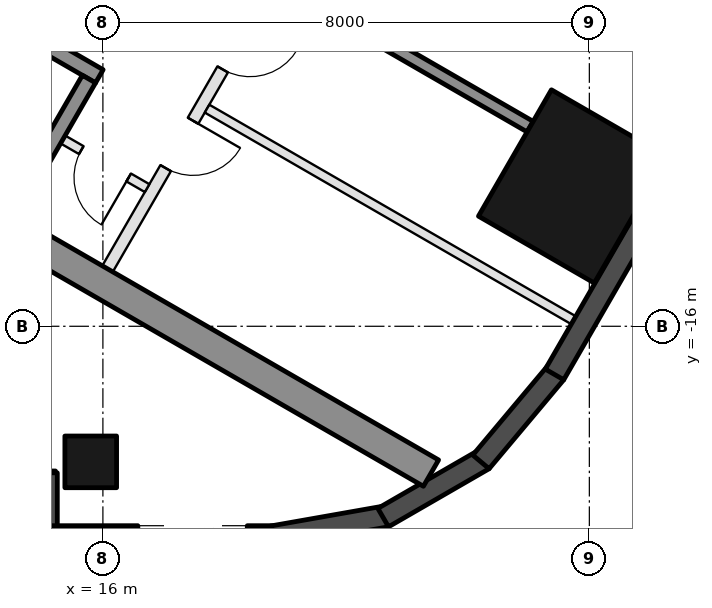
"""IFC4 building model, lengths in metres.
Left out: names, types, materials, properties, quantities, classifications, styles, units other than length and angle.
Written with IfcOpenShell. Run it as: python <this file> out.ifc"""

import sys

from ifc_helpers import new_model, si_unit, direction, frame, frame_2d, origin, origin_2d, place, context, subcontext, project, spatial, rectangle, hollow_rectangle, extrude, element, fill, save


model = new_model("IFC4")
c1 = context("Model", 3, precision=1e-05, world=origin(), true_north=direction((0.0, 1.0)))
c2 = subcontext(c1, "Body", "Model", "MODEL_VIEW")
j1 = project(units=[si_unit("LENGTHUNIT", "METRE"), si_unit("PLANEANGLEUNIT", "RADIAN")], contexts=[c1])
p1 = place(None, origin())
s1 = spatial("IfcSite", under=j1, at=p1, CompositionType="ELEMENT")
p2 = place(p1, origin())
s2 = spatial("IfcBuilding", under=s1, at=p2, CompositionType="ELEMENT")
p3 = place(p2, frame((0.0, 0.0, 179.9)))
s3 = spatial("IfcBuildingStorey", under=s2, at=p3, CompositionType="ELEMENT", Elevation=179.9)
p4 = place(p3, frame((15.8, -18.23, 0.0), z_axis=(0.0, 0.0, 1.0), x_axis=(-1.0, 0.0, 0.0)))
e1 = element("IfcColumn", 1, at=p4, inside=s3, PredefinedType="COLUMN", context=c2, shape_type="SweptSolid", body=[
    extrude(hollow_rectangle(XDim=0.85, YDim=0.85, WallThickness=0.04, at=origin_2d()), origin(), (0.0, 0.0, 1.0), 3.7),
])
p5 = place(p3, frame((23.729, -13.7, 0.0), z_axis=(0.0, 0.0, 1.0), x_axis=(0.5, 0.866025403784, 0.0)))
e2 = element("IfcColumn", 2, at=p5, inside=s3, PredefinedType="COLUMN", context=c2, shape_type="SweptSolid", body=[
    extrude(hollow_rectangle(XDim=2.4, YDim=2.2, WallThickness=0.06, at=origin_2d()), origin(), (0.0, 0.0, 1.0), 3.7),
])
p6 = place(p3, frame((8.48, -18.555, 0.0), z_axis=(0.0, 0.0, 1.0), x_axis=(1.0, 0.0, 0.0)))
e3 = element("IfcWall", 3, at=p6, inside=s3, PredefinedType="SOLIDWALL", context=c2, shape_type="SweptSolid", body=[
    extrude(rectangle(XDim=6.74, YDim=0.35, at=frame_2d((3.37, 0.0))), origin(), (0.0, 0.0, 1.0), 3.55),
])
p7 = place(p6, frame((3.57, 0.0, 0.0)))
e4 = element("IfcOpeningElement", 4, at=p7, cuts=e3, PredefinedType="OPENING", context=c2, shape_type="SweptSolid", body=[
    extrude(rectangle(XDim=2.4, YDim=2.4, at=frame_2d((1.2, 1.2))), frame((0.0, 0.185, 0.0), z_axis=(0.0, -1.0, 0.0), x_axis=(1.0, 0.0, 0.0)), (0.0, 0.0, 1.0), 0.37),
])
p8 = place(p6, frame((0.32, 0.0, 0.3)))
e5 = element("IfcOpeningElement", 5, at=p8, cuts=e3, PredefinedType="OPENING", context=c2, shape_type="SweptSolid", body=[
    extrude(rectangle(XDim=2.9, YDim=2.65, at=frame_2d((1.45, 1.325))), frame((0.0, 0.185, 0.0), z_axis=(0.0, -1.0, 0.0), x_axis=(1.0, 0.0, 0.0)), (0.0, 0.0, 1.0), 0.37),
])
p9 = place(p3, frame((15.075, -18.41, 0.0), z_axis=(0.0, 0.0, 1.0), x_axis=(0.0, -1.0, 0.0)))
e6 = element("IfcWall", 6, at=p9, inside=s3, PredefinedType="SOLIDWALL", context=c2, shape_type="SweptSolid", body=[
    extrude(rectangle(XDim=1.22, YDim=0.35, at=frame_2d((0.61, 0.0))), origin(), (0.0, 0.0, 1.0), 3.55),
])
p10 = place(p3, frame((14.9, -19.455, 0.0), z_axis=(0.0, 0.0, 1.0), x_axis=(1.0, 0.0, 0.0)))
e7 = element("IfcWall", 7, at=p10, inside=s3, PredefinedType="SOLIDWALL", context=c2, shape_type="SweptSolid", body=[
    extrude(rectangle(XDim=3.916, YDim=0.35, at=frame_2d((1.958, 0.0))), origin(), (0.0, 0.0, 1.0), 3.55),
])
p11 = place(p10, frame((1.675, 0.0, 0.3)))
e8 = element("IfcOpeningElement", 8, at=p11, cuts=e7, PredefinedType="OPENING", context=c2, shape_type="SweptSolid", body=[
    extrude(rectangle(XDim=1.8, YDim=2.65, at=frame_2d((0.9, 1.325))), frame((0.0, 0.185, 0.0), z_axis=(0.0, -1.0, 0.0), x_axis=(1.0, 0.0, 0.0)), (0.0, 0.0, 1.0), 0.37),
])
p12 = place(p3, frame((18.785, -19.458, 0.0), z_axis=(0.0, 0.0, 1.0), x_axis=(0.984798995425, 0.173697837091, 0.0)))
e9 = element("IfcWall", 9, at=p12, inside=s3, PredefinedType="SOLIDWALL", context=c2, shape_type="SweptSolid", body=[
    extrude(rectangle(XDim=1.91, YDim=0.35, at=frame_2d((0.955, 0.0))), origin(), (0.0, 0.0, 1.0), 3.55),
])
for number, where, z_axis, x_axis in (
    (10, (20.61, -19.147, 0.0), (0.0, 0.0, 1.0), (0.866, 0.5, 0.0)),
    (11, (22.217, -18.231, 0.0), (0.0, 0.0, 1.0), (0.643, 0.766, 0.0)),
):
    element("IfcWall", number, at=place(p3, frame(where, z_axis=z_axis, x_axis=x_axis)), inside=s3, PredefinedType="SOLIDWALL", context=c2, shape_type="SweptSolid", body=[
        extrude(rectangle(XDim=1.91, YDim=0.35, at=frame_2d((0.955, 0.0))), origin(), (0.0, 0.0, 1.0), 3.55),
    ])
p13 = place(p3, frame((23.427, -16.792, 0.0), z_axis=(0.0, 0.0, 1.0), x_axis=(0.500018773155, 0.866014564827, 0.0)))
e12 = element("IfcWall", 12, at=p13, inside=s3, PredefinedType="SOLIDWALL", context=c2, shape_type="SweptSolid", body=[
    extrude(rectangle(XDim=5.658, YDim=0.35, at=frame_2d((2.829, 0.0))), origin(), (0.0, 0.0, 1.0), 3.55),
])
p14 = place(p3, frame((8.547, -10.997, 0.0), z_axis=(0.0, 0.0, 1.0), x_axis=(0.866025009528, -0.500000682871, 0.0)))
e13 = element("IfcWall", 13, at=p14, inside=s3, PredefinedType="SHEAR", context=c2, shape_type="SweptSolid", body=[
    extrude(rectangle(XDim=14.837, YDim=0.5, at=frame_2d((7.418, 0.0))), origin(), (0.0, 0.0, 1.0), 3.5),
])
p15 = place(p3, frame((10.356, -8.664, 0.0), z_axis=(0.0, 0.0, 1.0), x_axis=(0.866028629588, -0.499994412703, 0.0)))
e14 = element("IfcWall", 14, at=p15, inside=s3, PredefinedType="SHEAR", context=c2, shape_type="SweptSolid", body=[
    extrude(rectangle(XDim=6.45, YDim=0.25, at=frame_2d((3.225, 0.0))), origin(), (0.0, 0.0, 1.0), 3.5),
])
p16 = place(p15, frame((0.3, 0.0, 0.0)))
e15 = element("IfcOpeningElement", 15, at=p16, cuts=e14, PredefinedType="OPENING", context=c2, shape_type="SweptSolid", body=[
    extrude(rectangle(XDim=1.0, YDim=2.1, at=frame_2d((0.5, 1.05))), frame((0.0, 0.135, 0.0), z_axis=(0.0, -1.0, 0.0), x_axis=(1.0, 0.0, 0.0)), (0.0, 0.0, 1.0), 0.27),
])
p17 = place(p3, frame((14.496, -14.143, 0.0), z_axis=(0.0, 0.0, 1.0), x_axis=(0.500062241894, 0.865989465428, 0.0)))
e16 = element("IfcWall", 16, at=p17, inside=s3, PredefinedType="SHEAR", context=c2, shape_type="SweptSolid", body=[
    extrude(rectangle(XDim=2.55, YDim=0.25, at=frame_2d((1.275, 0.0))), origin(), (0.0, 0.0, 1.0), 3.5),
])
p18 = place(p3, frame((20.567, -11.297, 0.0), z_axis=(0.0, 0.0, 1.0), x_axis=(0.866055327414, -0.49994816717, 0.0)))
e17 = element("IfcWall", 17, at=p18, inside=s3, PredefinedType="SHEAR", context=c2, shape_type="SweptSolid", body=[
    extrude(rectangle(XDim=2.84, YDim=0.2, at=frame_2d((1.42, 0.0))), origin(), (0.0, 0.0, 1.0), 3.5),
])
p19 = place(p3, frame((16.076, -15.055, 0.0), z_axis=(0.0, 0.0, 1.0), x_axis=(0.499995103361, 0.866028230842, 0.0)))
e18 = element("IfcWall", 18, at=p19, inside=s3, PredefinedType="PARTITIONING", context=c2, shape_type="SweptSolid", body=[
    extrude(rectangle(XDim=5.4, YDim=0.2, at=frame_2d((2.7, 0.0))), origin(), (0.0, 0.0, 1.0), 3.5),
])
p20 = place(p19, frame((1.913, 0.0, 0.0)))
e19 = element("IfcOpeningElement", 19, at=p20, cuts=e18, PredefinedType="OPENING", context=c2, shape_type="SweptSolid", body=[
    extrude(rectangle(XDim=0.9, YDim=2.1, at=frame_2d((0.45, 1.05))), frame((0.0, 0.11, 0.0), z_axis=(0.0, -1.0, 0.0), x_axis=(1.0, 0.0, 0.0)), (0.0, 0.0, 1.0), 0.22),
])
p21 = place(p19, frame((3.788, 0.0, 0.0)))
e20 = element("IfcOpeningElement", 20, at=p21, cuts=e18, PredefinedType="OPENING", context=c2, shape_type="SweptSolid", body=[
    extrude(rectangle(XDim=0.9, YDim=2.1, at=frame_2d((0.45, 1.05))), frame((0.0, 0.11, 0.0), z_axis=(0.0, -1.0, 0.0), x_axis=(1.0, 0.0, 0.0)), (0.0, 0.0, 1.0), 0.22),
])
p22 = place(p3, frame((15.342, -12.928, 0.0), z_axis=(0.0, 0.0, 1.0), x_axis=(0.865989903783, -0.500061482766, 0.0)))
e21 = element("IfcWall", 21, at=p22, inside=s3, PredefinedType="PARTITIONING", context=c2, shape_type="SweptSolid", body=[
    extrude(rectangle(XDim=1.6, YDim=0.15, at=frame_2d((0.8, 0.0))), origin(), (0.0, 0.0, 1.0), 3.5),
])
p23 = place(p22, frame((0.35, 0.0, 0.0)))
e22 = element("IfcOpeningElement", 22, at=p23, cuts=e21, PredefinedType="OPENING", context=c2, shape_type="SweptSolid", body=[
    extrude(rectangle(XDim=0.9, YDim=2.1, at=frame_2d((0.45, 1.05))), frame((0.0, 0.085, 0.0), z_axis=(0.0, -1.0, 0.0), x_axis=(1.0, 0.0, 0.0)), (0.0, 0.0, 1.0), 0.17),
])
p24 = place(p3, frame((17.713, -12.42, 0.0), z_axis=(0.0, 0.0, 1.0), x_axis=(0.866016523273, -0.500015381182, 0.0)))
e23 = element("IfcWall", 23, at=p24, inside=s3, PredefinedType="PARTITIONING", context=c2, shape_type="SweptSolid", body=[
    extrude(rectangle(XDim=6.95, YDim=0.15, at=frame_2d((3.475, 0.0))), origin(), (0.0, 0.0, 1.0), 3.5),
])
p25 = place(p23, frame((0.9, 0.0, 0.0), z_axis=(0.0, 0.0, 1.0), x_axis=(-1.0, 0.0, 0.0)))
e24 = element("IfcDoor", 24, at=p25, inside=s3, OperationType="SINGLE_SWING_LEFT", PredefinedType="DOOR", context=c2, shape_type="SweptSolid", body=[
    extrude(rectangle(XDim=0.9, YDim=2.1, at=frame_2d((0.45, 1.05))), frame((0.0, 0.025, 0.0), z_axis=(0.0, -1.0, 0.0), x_axis=(1.0, 0.0, 0.0)), (0.0, 0.0, 1.0), 0.05),
])
fill(e22, e24)
p26 = place(p20, frame((0.9, 0.0, 0.0), z_axis=(0.0, 0.0, 1.0), x_axis=(-1.0, 0.0, 0.0)))
e25 = element("IfcDoor", 25, at=p26, inside=s3, OperationType="SINGLE_SWING_LEFT", PredefinedType="DOOR", context=c2, shape_type="SweptSolid", body=[
    extrude(rectangle(XDim=0.9, YDim=2.1, at=frame_2d((0.45, 1.05))), frame((0.0, 0.025, 0.0), z_axis=(0.0, -1.0, 0.0), x_axis=(1.0, 0.0, 0.0)), (0.0, 0.0, 1.0), 0.05),
])
fill(e19, e25)
p27 = place(p21, frame((0.9, 0.0, 0.0), z_axis=(0.0, 0.0, 1.0), x_axis=(-1.0, 0.0, 0.0)))
e26 = element("IfcDoor", 26, at=p27, inside=s3, OperationType="SINGLE_SWING_LEFT", PredefinedType="DOOR", context=c2, shape_type="SweptSolid", body=[
    extrude(rectangle(XDim=0.9, YDim=2.1, at=frame_2d((0.45, 1.05))), frame((0.0, 0.025, 0.0), z_axis=(0.0, -1.0, 0.0), x_axis=(1.0, 0.0, 0.0)), (0.0, 0.0, 1.0), 0.05),
])
fill(e20, e26)
save(model, sys.argv[1])
